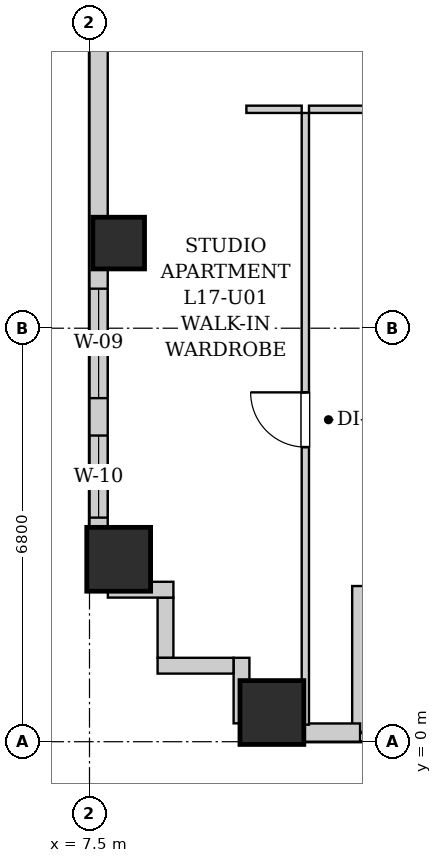
"""IFC4 building model, lengths in metres.
Left out: names, types, materials, properties, quantities, classifications, styles, units other than length and angle.
Written with IfcOpenShell. Run it as: python <this file> out.ifc"""

import sys

from ifc_helpers import new_model, si_unit, direction, frame, frame_2d, origin, origin_2d, place, context, subcontext, project, spatial, rectangle, extrude, element, fill, save


model = new_model("IFC4")
c1 = context("Model", 3, precision=1e-05, world=origin(), true_north=direction((0.0, 1.0)))
c2 = subcontext(c1, "Body", "Model", "MODEL_VIEW")
j1 = project(units=[si_unit("LENGTHUNIT", "METRE"), si_unit("PLANEANGLEUNIT", "RADIAN")], contexts=[c1])
p1 = place(None, origin())
s1 = spatial("IfcSite", under=j1, at=p1, CompositionType="ELEMENT")
p2 = place(p1, origin())
s2 = spatial("IfcBuilding", under=s1, at=p2, CompositionType="ELEMENT")
p3 = place(p2, frame((0.0, 0.0, 64.2)))
s3 = spatial("IfcBuildingStorey", under=s2, at=p3, CompositionType="ELEMENT", Elevation=64.2)
for number, where, z_axis, x_axis in (
    (1, (10.5, 0.48, 0.0), (0.0, 0.0, 1.0), (1.0, 0.0, 0.0)),
    (2, (7.98, 3.0, 0.0), (0.0, 0.0, 1.0), (1.0, 0.0, 0.0)),
):
    element("IfcColumn", number, at=place(p3, frame(where, z_axis=z_axis, x_axis=x_axis)), inside=s3, PredefinedType="COLUMN", context=c2, shape_type="SweptSolid", body=[
        extrude(rectangle(XDim=1.05, YDim=1.05, at=origin_2d()), origin(), (0.0, 0.0, 1.0), 3.2),
    ])
p4 = place(p3, frame((7.98, 8.2, 0.0), z_axis=(0.0, 0.0, 1.0), x_axis=(1.0, 0.0, 0.0)))
e3 = element("IfcColumn", 3, at=p4, inside=s3, PredefinedType="COLUMN", context=c2, shape_type="SweptSolid", body=[
    extrude(rectangle(XDim=0.85, YDim=0.85, at=origin_2d()), origin(), (0.0, 0.0, 1.0), 3.2),
])
p5 = place(p3, frame((11.95, 2.56, 0.0), z_axis=(0.0, 0.0, 1.0), x_axis=(0.0, -1.0, 0.0)))
e4 = element("IfcWall", 4, at=p5, inside=s3, PredefinedType="SOLIDWALL", context=c2, shape_type="SweptSolid", body=[
    extrude(rectangle(XDim=2.4, YDim=0.26, at=frame_2d((1.2, 0.0))), origin(), (0.0, 0.0, 1.0), 2.94),
])
p6 = place(p3, frame((11.95, 0.15, 0.0), z_axis=(0.0, 0.0, 1.0), x_axis=(-1.0, 0.0, 0.0)))
e5 = element("IfcWall", 5, at=p6, inside=s3, PredefinedType="SOLIDWALL", context=c2, shape_type="SweptSolid", body=[
    extrude(rectangle(XDim=1.95, YDim=0.3, at=frame_2d((0.975, 0.0))), origin(), (0.0, 0.0, 1.0), 1.975),
])
p7 = place(p3, frame((7.65, 2.5, 0.0), z_axis=(0.0, 0.0, 1.0), x_axis=(0.0, 1.0, 0.0)))
e6 = element("IfcWall", 6, at=p7, inside=s3, PredefinedType="SOLIDWALL", context=c2, shape_type="SweptSolid", body=[
    extrude(rectangle(XDim=42.6, YDim=0.3, at=frame_2d((21.3, 0.0))), origin(), (0.0, 0.0, 1.0), 1.975),
])
p8 = place(p7, frame((3.15, 0.0, 0.55)))
e7 = element("IfcOpeningElement", 7, at=p8, cuts=e6, PredefinedType="OPENING", context=c2, shape_type="SweptSolid", body=[
    extrude(rectangle(XDim=1.8, YDim=1.2, at=frame_2d((0.9, 0.6))), frame((0.0, 0.16, 0.0), z_axis=(0.0, -1.0, 0.0), x_axis=(1.0, 0.0, 0.0)), (0.0, 0.0, 1.0), 0.32),
])
p9 = place(p7, frame((1.185, 0.0, 0.55)))
e8 = element("IfcOpeningElement", 8, at=p9, cuts=e6, PredefinedType="OPENING", context=c2, shape_type="SweptSolid", body=[
    extrude(rectangle(XDim=1.35, YDim=1.2, at=frame_2d((0.675, 0.6))), frame((0.0, 0.16, 0.0), z_axis=(0.0, -1.0, 0.0), x_axis=(1.0, 0.0, 0.0)), (0.0, 0.0, 1.0), 0.32),
])
p10 = place(p7, frame((37.085, 0.0, 0.55)))
e9 = element("IfcOpeningElement", 9, at=p10, cuts=e6, PredefinedType="OPENING", context=c2, shape_type="SweptSolid", body=[
    extrude(rectangle(XDim=1.8, YDim=1.2, at=frame_2d((0.9, 0.6))), frame((0.0, 0.16, 0.0), z_axis=(0.0, -1.0, 0.0), x_axis=(1.0, 0.0, 0.0)), (0.0, 0.0, 1.0), 0.32),
])
p11 = place(p7, frame((31.55, 0.0, 0.55)))
e10 = element("IfcOpeningElement", 10, at=p11, cuts=e6, PredefinedType="OPENING", context=c2, shape_type="SweptSolid", body=[
    extrude(rectangle(XDim=1.35, YDim=1.2, at=frame_2d((0.675, 0.6))), frame((0.0, 0.16, 0.0), z_axis=(0.0, -1.0, 0.0), x_axis=(1.0, 0.0, 0.0)), (0.0, 0.0, 1.0), 0.32),
])
p12 = place(p7, frame((15.2, 0.0, 0.55)))
e11 = element("IfcOpeningElement", 11, at=p12, cuts=e6, PredefinedType="OPENING", context=c2, shape_type="SweptSolid", body=[
    extrude(rectangle(XDim=1.8, YDim=1.2, at=frame_2d((0.9, 0.6))), frame((0.0, 0.16, 0.0), z_axis=(0.0, -1.0, 0.0), x_axis=(1.0, 0.0, 0.0)), (0.0, 0.0, 1.0), 0.32),
])
p13 = place(p7, frame((13.085, 0.0, 0.55)))
e12 = element("IfcOpeningElement", 12, at=p13, cuts=e6, PredefinedType="OPENING", context=c2, shape_type="SweptSolid", body=[
    extrude(rectangle(XDim=1.35, YDim=1.2, at=frame_2d((0.675, 0.6))), frame((0.0, 0.16, 0.0), z_axis=(0.0, -1.0, 0.0), x_axis=(1.0, 0.0, 0.0)), (0.0, 0.0, 1.0), 0.32),
])
p14 = place(p7, frame((22.575, 0.0, 0.55)))
e13 = element("IfcOpeningElement", 13, at=p14, cuts=e6, PredefinedType="OPENING", context=c2, shape_type="SweptSolid", body=[
    extrude(rectangle(XDim=1.8, YDim=1.2, at=frame_2d((0.9, 0.6))), frame((0.0, 0.16, 0.0), z_axis=(0.0, -1.0, 0.0), x_axis=(1.0, 0.0, 0.0)), (0.0, 0.0, 1.0), 0.32),
])
p15 = place(p3, frame((10.0, 0.302, 0.0), z_axis=(0.0, 0.0, 1.0), x_axis=(0.0, 1.0, 0.0)))
e14 = element("IfcWall", 14, at=p15, inside=s3, PredefinedType="SOLIDWALL", context=c2, shape_type="SweptSolid", body=[
    extrude(rectangle(XDim=1.078, YDim=0.26, at=frame_2d((0.539, 0.0))), origin(), (0.0, 0.0, 1.0), 2.94),
])
p16 = place(p3, frame((9.868, 1.25, 0.0), z_axis=(0.0, 0.0, 1.0), x_axis=(-1.0, 0.0, 0.0)))
e15 = element("IfcWall", 15, at=p16, inside=s3, PredefinedType="SOLIDWALL", context=c2, shape_type="SweptSolid", body=[
    extrude(rectangle(XDim=1.248, YDim=0.26, at=frame_2d((0.624, 0.0))), origin(), (0.0, 0.0, 1.0), 2.94),
])
p17 = place(p3, frame((8.75, 1.382, 0.0), z_axis=(0.0, 0.0, 1.0), x_axis=(0.0, 1.0, 0.0)))
e16 = element("IfcWall", 16, at=p17, inside=s3, PredefinedType="SOLIDWALL", context=c2, shape_type="SweptSolid", body=[
    extrude(rectangle(XDim=0.986, YDim=0.26, at=frame_2d((0.493, 0.0))), origin(), (0.0, 0.0, 1.0), 2.94),
])
p18 = place(p3, frame((8.88, 2.5, 0.0), z_axis=(0.0, 0.0, 1.0), x_axis=(-1.0, 0.0, 0.0)))
e17 = element("IfcWall", 17, at=p18, inside=s3, PredefinedType="SOLIDWALL", context=c2, shape_type="SweptSolid", body=[
    extrude(rectangle(XDim=1.078, YDim=0.26, at=frame_2d((0.539, 0.0))), origin(), (0.0, 0.0, 1.0), 2.94),
])
p19 = place(p3, frame((10.08, 10.4, 0.0), z_axis=(0.0, 0.0, 1.0), x_axis=(1.0, 0.0, 0.0)))
e18 = element("IfcWall", 18, at=p19, inside=s3, PredefinedType="PARTITIONING", context=c2, shape_type="SweptSolid", body=[
    extrude(rectangle(XDim=0.91, YDim=0.12, at=frame_2d((0.455, 0.0))), origin(), (0.0, 0.0, 1.0), 2.94),
])
p20 = place(p3, frame((11.11, 10.4, 0.0), z_axis=(0.0, 0.0, 1.0), x_axis=(1.0, 0.0, 0.0)))
e19 = element("IfcWall", 19, at=p20, inside=s3, PredefinedType="PARTITIONING", context=c2, shape_type="SweptSolid", body=[
    extrude(rectangle(XDim=1.37, YDim=0.12, at=frame_2d((0.685, 0.0))), origin(), (0.0, 0.0, 1.0), 2.94),
])
p21 = place(p3, frame((11.05, 0.28, 0.0), z_axis=(0.0, 0.0, 1.0), x_axis=(0.0, 1.0, 0.0)))
e20 = element("IfcWall", 20, at=p21, inside=s3, PredefinedType="PARTITIONING", context=c2, shape_type="SweptSolid", body=[
    extrude(rectangle(XDim=10.06, YDim=0.12, at=frame_2d((5.03, 0.0))), origin(), (0.0, 0.0, 1.0), 2.94),
])
p22 = place(p21, frame((4.565, 0.0, 0.0)))
e21 = element("IfcOpeningElement", 21, at=p22, cuts=e20, PredefinedType="OPENING", context=c2, shape_type="SweptSolid", body=[
    extrude(rectangle(XDim=0.9, YDim=2.05, at=frame_2d((0.45, 1.025))), frame((0.0, 0.07, 0.0), z_axis=(0.0, -1.0, 0.0), x_axis=(1.0, 0.0, 0.0)), (0.0, 0.0, 1.0), 0.14),
])
p23 = place(p22, origin())
e22 = element("IfcDoor", 22, at=p23, inside=s3, OperationType="SINGLE_SWING_RIGHT", PredefinedType="DOOR", context=c2, shape_type="SweptSolid", body=[
    extrude(rectangle(XDim=0.9, YDim=2.05, at=frame_2d((0.45, 1.025))), frame((0.0, 0.025, 0.0), z_axis=(0.0, -1.0, 0.0), x_axis=(1.0, 0.0, 0.0)), (0.0, 0.0, 1.0), 0.05),
])
fill(e21, e22)
p24 = place(p8, origin())
e23 = element("IfcWindow", 23, at=p24, inside=s3, PartitioningType="DOUBLE_PANEL_VERTICAL", PredefinedType="WINDOW", context=c2, shape_type="SweptSolid", body=[
    extrude(rectangle(XDim=1.8, YDim=1.2, at=frame_2d((0.9, 0.6))), frame((0.0, 0.03, 0.0), z_axis=(0.0, -1.0, 0.0), x_axis=(1.0, 0.0, 0.0)), (0.0, 0.0, 1.0), 0.06),
])
fill(e7, e23)
p25 = place(p9, origin())
e24 = element("IfcWindow", 24, at=p25, inside=s3, PartitioningType="SINGLE_PANEL", PredefinedType="WINDOW", context=c2, shape_type="SweptSolid", body=[
    extrude(rectangle(XDim=1.35, YDim=1.2, at=frame_2d((0.675, 0.6))), frame((0.0, 0.03, 0.0), z_axis=(0.0, -1.0, 0.0), x_axis=(1.0, 0.0, 0.0)), (0.0, 0.0, 1.0), 0.06),
])
fill(e8, e24)
save(model, sys.argv[1])
